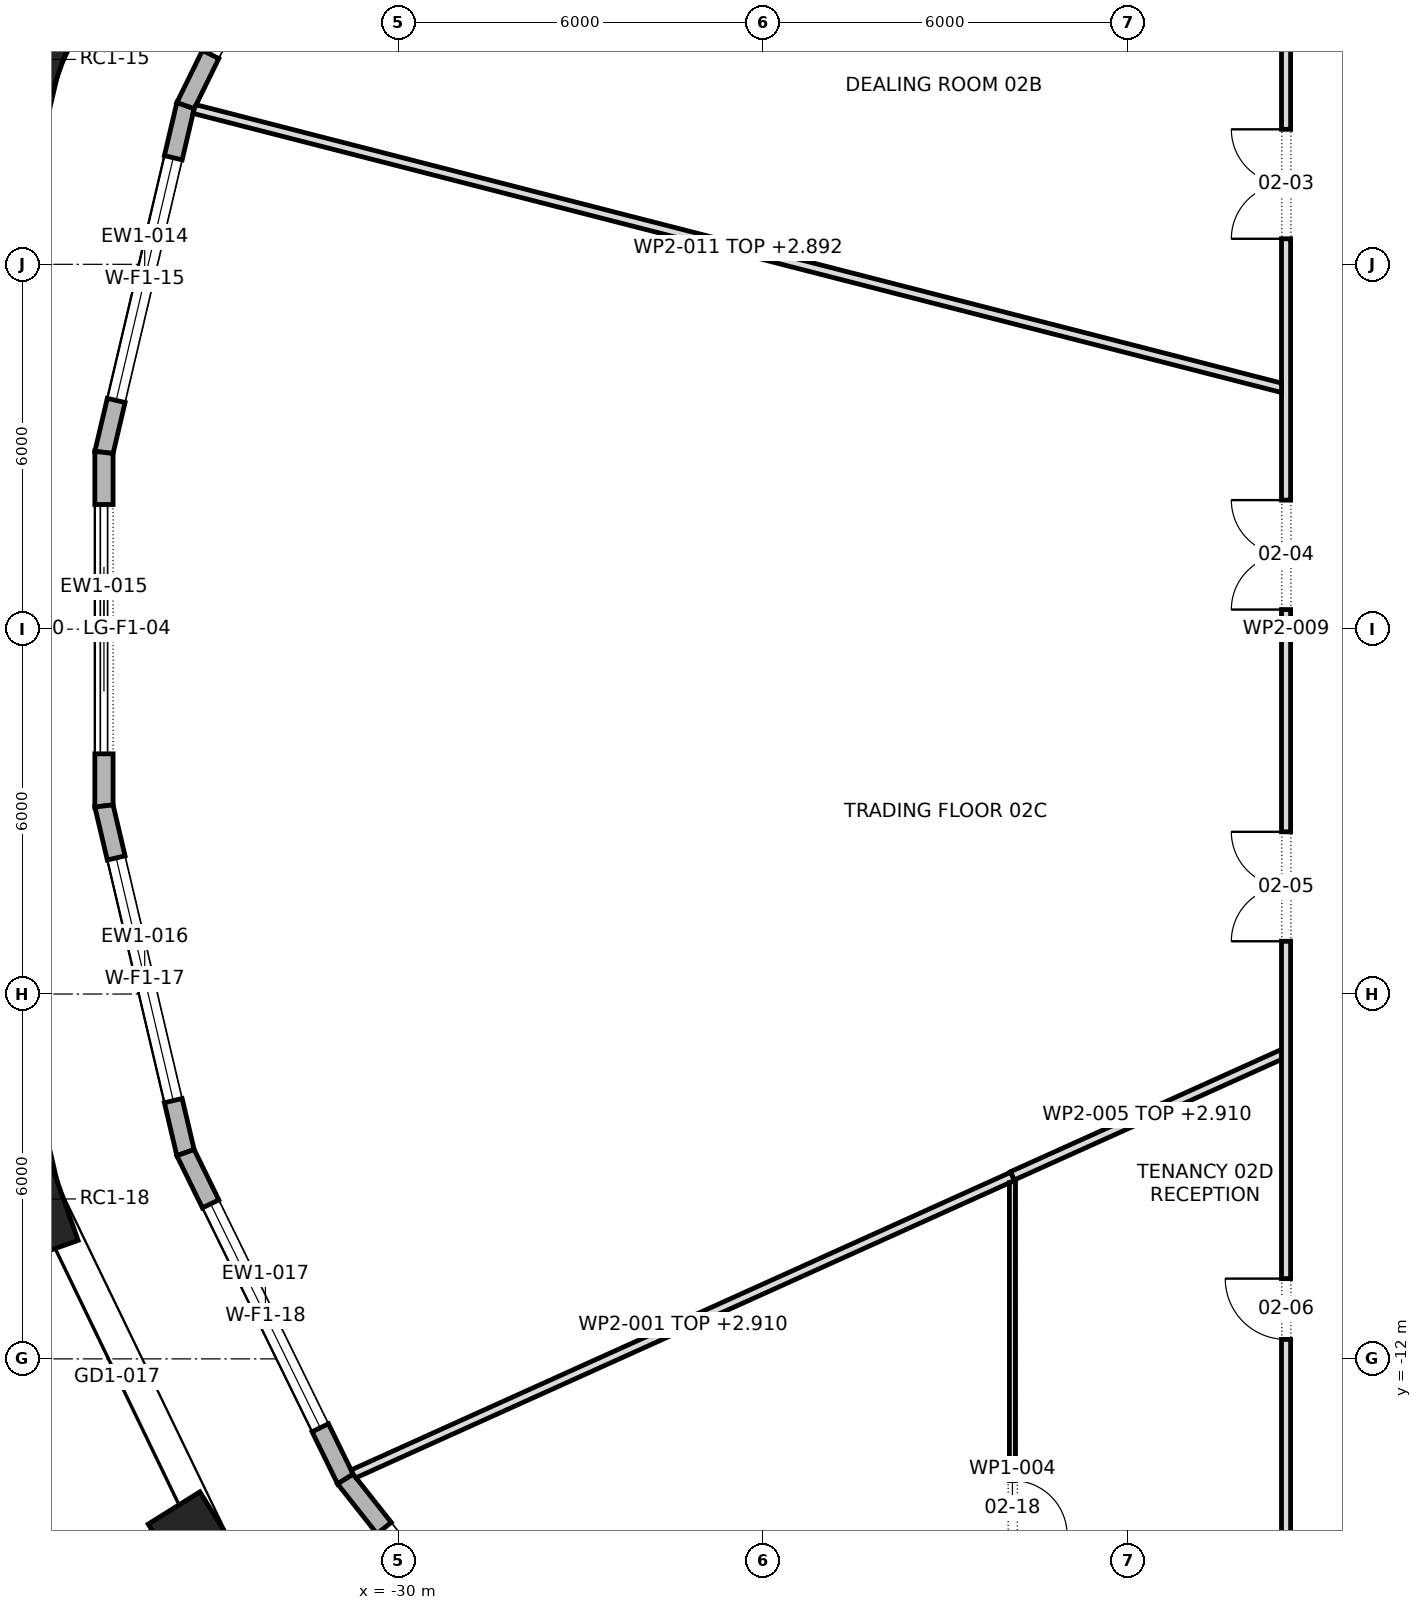
"""IFC4 building model, lengths in metres.
Left out: names, types, materials, properties, quantities, classifications, styles, units other than length and angle.
Written with IfcOpenShell. Run it as: python <this file> out.ifc"""

import sys

from ifc_helpers import new_model, si_unit, direction, frame, frame_2d, origin, origin_2d, place, context, subcontext, project, spatial, polyline, rectangle, outline, extrude, element, fill, save


model = new_model("IFC4")
c1 = context("Model", 3, precision=1e-05, world=origin(), true_north=direction((0.0, 1.0)))
c2 = subcontext(c1, "Body", "Model", "MODEL_VIEW")
j1 = project(units=[si_unit("LENGTHUNIT", "METRE"), si_unit("PLANEANGLEUNIT", "RADIAN")], contexts=[c1])
p1 = place(None, origin())
s1 = spatial("IfcSite", under=j1, at=p1, CompositionType="ELEMENT")
p2 = place(p1, origin())
s2 = spatial("IfcBuilding", under=s1, at=p2, CompositionType="ELEMENT")
p3 = place(p2, frame((0.0, 0.0, 36.1)))
s3 = spatial("IfcBuildingStorey", under=s2, at=p3, CompositionType="ELEMENT", Elevation=36.1)
for number, where, z_axis, x_axis in (
    (1, (-36.036, 9.37, 0.0), (0.0, 0.0, 1.0), (-0.334, -0.943, 0.0)),
    (2, (-36.036, -9.37, 0.0), (0.0, 0.0, 1.0), (0.334, -0.943, 0.0)),
    (3, (-33.211, -15.216, 0.0), (0.0, 0.0, 1.0), (0.529, -0.849, 0.0)),
):
    element("IfcColumn", number, at=place(p3, frame(where, z_axis=z_axis, x_axis=x_axis)), inside=s3, PredefinedType="COLUMN", context=c2, shape_type="SweptSolid", body=[
        extrude(rectangle(XDim=1.8, YDim=1.0, at=origin_2d()), origin(), (0.0, 0.0, 1.0), 4.2),
    ])
p4 = place(p3, frame((-30.869, 13.976, 0.0), z_axis=(0.0, 0.0, 1.0), x_axis=(-0.439896354052, -0.898048549741, 0.0)))
e4 = element("IfcWall", 4, at=p4, inside=s3, PredefinedType="STANDARD", context=c2, shape_type="SweptSolid", body=[
    extrude(outline(polyline([(-0.016, -0.15), (5.995, -0.15), (5.961, 0.15), (0.016, 0.15), (-0.016, -0.15)])), origin(), (0.0, 0.0, 1.0), 3.9),
])
p5 = place(p4, frame((0.939, 0.0, 0.6)))
e5 = element("IfcOpeningElement", 5, at=p5, cuts=e4, PredefinedType="OPENING", context=c2, shape_type="SweptSolid", body=[
    extrude(rectangle(XDim=4.1, YDim=2.85, at=frame_2d((2.05, 1.425))), frame((0.0, 0.162, 0.0), z_axis=(0.0, -1.0, 0.0), x_axis=(1.0, 0.0, 0.0)), (0.0, 0.0, 1.0), 0.324),
])
p6 = place(p3, frame((-33.499, 8.608, 0.0), z_axis=(0.0, 0.0, 1.0), x_axis=(-0.228976600496, -0.97343192696, 0.0)))
e6 = element("IfcWall", 6, at=p6, inside=s3, PredefinedType="STANDARD", context=c2, shape_type="SweptSolid", body=[
    extrude(outline(polyline([(-0.017, -0.15), (5.874, -0.15), (5.839, 0.15), (0.017, 0.15), (-0.017, -0.15)])), origin(), (0.0, 0.0, 1.0), 3.9),
])
p7 = place(p6, frame((0.878, 0.0, 0.6)))
e7 = element("IfcOpeningElement", 7, at=p7, cuts=e6, PredefinedType="OPENING", context=c2, shape_type="SweptSolid", body=[
    extrude(rectangle(XDim=4.1, YDim=2.85, at=frame_2d((2.05, 1.425))), frame((0.0, 0.162, 0.0), z_axis=(0.0, -1.0, 0.0), x_axis=(1.0, 0.0, 0.0)), (0.0, 0.0, 1.0), 0.324),
])
p8 = place(p3, frame((-34.84, 2.907, 0.0), z_axis=(0.0, 0.0, 1.0), x_axis=(0.0, -1.0, 0.0)))
e8 = element("IfcWall", 8, at=p8, inside=s3, PredefinedType="STANDARD", context=c2, shape_type="SweptSolid", body=[
    extrude(outline(polyline([(-0.017, -0.15), (5.831, -0.15), (5.796, 0.15), (0.017, 0.15), (-0.017, -0.15)])), origin(), (0.0, 0.0, 1.0), 3.9),
])
p9 = place(p8, frame((0.857, 0.0, 0.0)))
e9 = element("IfcOpeningElement", 9, at=p9, cuts=e8, PredefinedType="OPENING", context=c2, shape_type="SweptSolid", body=[
    extrude(rectangle(XDim=4.1, YDim=3.45, at=frame_2d((2.05, 1.725))), frame((0.0, 0.162, 0.0), z_axis=(0.0, -1.0, 0.0), x_axis=(1.0, 0.0, 0.0)), (0.0, 0.0, 1.0), 0.324),
])
p10 = place(p3, frame((-34.84, -2.907, 0.0), z_axis=(0.0, 0.0, 1.0), x_axis=(0.228976600496, -0.97343192696, 0.0)))
e10 = element("IfcWall", 10, at=p10, inside=s3, PredefinedType="STANDARD", context=c2, shape_type="SweptSolid", body=[
    extrude(outline(polyline([(-0.017, -0.15), (5.874, -0.15), (5.84, 0.15), (0.017, 0.15), (-0.017, -0.15)])), origin(), (0.0, 0.0, 1.0), 3.9),
])
p11 = place(p10, frame((0.878, 0.0, 0.6)))
e11 = element("IfcOpeningElement", 11, at=p11, cuts=e10, PredefinedType="OPENING", context=c2, shape_type="SweptSolid", body=[
    extrude(rectangle(XDim=4.1, YDim=2.85, at=frame_2d((2.05, 1.425))), frame((0.0, 0.162, 0.0), z_axis=(0.0, -1.0, 0.0), x_axis=(1.0, 0.0, 0.0)), (0.0, 0.0, 1.0), 0.324),
])
p12 = place(p3, frame((-33.499, -8.608, 0.0), z_axis=(0.0, 0.0, 1.0), x_axis=(0.439896354052, -0.898048549741, 0.0)))
e12 = element("IfcWall", 12, at=p12, inside=s3, PredefinedType="STANDARD", context=c2, shape_type="SweptSolid", body=[
    extrude(outline(polyline([(-0.017, -0.15), (5.994, -0.15), (5.962, 0.15), (0.017, 0.15), (-0.017, -0.15)])), origin(), (0.0, 0.0, 1.0), 3.9),
])
p13 = place(p12, frame((0.939, 0.0, 0.6)))
e13 = element("IfcOpeningElement", 13, at=p13, cuts=e12, PredefinedType="OPENING", context=c2, shape_type="SweptSolid", body=[
    extrude(rectangle(XDim=4.1, YDim=2.85, at=frame_2d((2.05, 1.425))), frame((0.0, 0.162, 0.0), z_axis=(0.0, -1.0, 0.0), x_axis=(1.0, 0.0, 0.0)), (0.0, 0.0, 1.0), 0.324),
])
p14 = place(p3, frame((-30.869, -13.976, 0.0), z_axis=(0.0, 0.0, 1.0), x_axis=(0.61992334328, -0.784662378642, 0.0)))
e14 = element("IfcWall", 14, at=p14, inside=s3, PredefinedType="STANDARD", context=c2, shape_type="SweptSolid", body=[
    extrude(outline(polyline([(-0.016, -0.15), (6.17, -0.15), (6.14, 0.15), (0.016, 0.15), (-0.016, -0.15)])), origin(), (0.0, 0.0, 1.0), 3.9),
])
p15 = place(p14, frame((1.027, 0.0, 0.6)))
e15 = element("IfcOpeningElement", 15, at=p15, cuts=e14, PredefinedType="OPENING", context=c2, shape_type="SweptSolid", body=[
    extrude(rectangle(XDim=4.1, YDim=2.85, at=frame_2d((2.05, 1.425))), frame((0.0, 0.162, 0.0), z_axis=(0.0, -1.0, 0.0), x_axis=(1.0, 0.0, 0.0)), (0.0, 0.0, 1.0), 0.324),
])
p16 = place(p3, frame((-30.744, -13.896, 0.0), z_axis=(0.0, 0.0, 1.0), x_axis=(0.91143189519, 0.411450969654, 0.0)))
e16 = element("IfcWall", 16, at=p16, inside=s3, PredefinedType="PARTITIONING", context=c2, shape_type="SweptSolid", body=[
    extrude(outline(polyline([(0.021, -0.075), (1.985, -0.075), (3.95, -0.075), (5.915, -0.075), (7.88, -0.075), (9.845, -0.075), (11.81, -0.075), (11.811, -0.073), (11.815, -0.075), (11.902, -0.075), (11.902, -0.066), (11.902, -0.066), (11.902, 0.062), (11.902, 0.075), (9.919, 0.075), (7.935, 0.075), (5.951, 0.075), (3.968, 0.075), (1.984, 0.075), (0.0, 0.075), (0.0, 0.066), (0.002, -0.001), (0.021, -0.075)])), origin(), (0.0, 0.0, 1.0), 2.91),
])
p17 = place(p3, frame((-19.9, -19.95, 0.0), z_axis=(0.0, 0.0, 1.0), x_axis=(0.0, 1.0, 0.0)))
e17 = element("IfcWall", 17, at=p17, inside=s3, PredefinedType="PARTITIONING", context=c2, shape_type="SweptSolid", body=[
    extrude(outline(polyline([(10.9, -0.05), (10.9, -0.049), (10.892, -0.031), (10.883, -0.034), (10.845, 0.05), (9.038, 0.05), (7.23, 0.05), (5.423, 0.05), (3.615, 0.05), (1.808, 0.05), (0.0, 0.05), (0.1, -0.05), (0.1, -0.05), (1.9, -0.05), (3.7, -0.05), (5.5, -0.05), (7.3, -0.05), (9.1, -0.05), (10.9, -0.05)])), origin(), (0.0, 0.0, 1.0), 3.9),
])
p18 = place(p17, frame((5.05, 0.0, 0.0)))
e18 = element("IfcOpeningElement", 18, at=p18, cuts=e17, PredefinedType="OPENING", context=c2, shape_type="SweptSolid", body=[
    extrude(rectangle(XDim=0.9, YDim=2.1, at=frame_2d((0.45, 1.05))), frame((0.0, 0.062, 0.0), z_axis=(0.0, -1.0, 0.0), x_axis=(1.0, 0.0, 0.0)), (0.0, 0.0, 1.0), 0.124),
])
p19 = place(p3, frame((-19.9, -8.99, 0.0), z_axis=(0.0, 0.0, 1.0), x_axis=(0.911546381607, 0.411197269178, 0.0)))
e19 = element("IfcWall", 19, at=p19, inside=s3, PredefinedType="PARTITIONING", context=c2, shape_type="SweptSolid", body=[
    extrude(outline(polyline([(0.02, -0.075), (1.62, -0.075), (3.22, -0.075), (4.821, -0.075), (4.888, 0.075), (3.259, 0.075), (1.629, 0.075), (0.0, 0.075), (0.0, -0.066), (0.02, -0.075)])), origin(), (0.0, 0.0, 1.0), 2.91),
])
p20 = place(p3, frame((-15.4, -15.475, 0.0), z_axis=(0.0, 0.0, 1.0), x_axis=(0.0, 1.0, 0.0)))
e20 = element("IfcWall", 20, at=p20, inside=s3, PredefinedType="PARTITIONING", context=c2, shape_type="SweptSolid", body=[
    extrude(outline(polyline([(0.15, -0.075), (2.066, -0.075), (3.981, -0.075), (5.897, -0.075), (7.812, -0.075), (9.728, -0.075), (11.644, -0.075), (13.56, -0.075), (15.475, -0.075), (17.391, -0.075), (19.306, -0.075), (21.222, -0.075), (23.138, -0.075), (25.053, -0.075), (26.969, -0.075), (28.885, -0.075), (30.8, -0.075), (30.95, 0.075), (29.016, 0.075), (27.081, 0.075), (25.147, 0.075), (23.212, 0.075), (21.278, 0.075), (19.344, 0.075), (17.409, 0.075), (15.475, 0.075), (13.541, 0.075), (11.606, 0.075), (9.672, 0.075), (7.738, 0.075), (5.803, 0.075), (3.869, 0.075), (1.935, 0.075), (0.0, 0.075), (0.15, -0.075)])), origin(), (0.0, 0.0, 1.0), 3.9),
])
p21 = place(p20, frame((28.02, 0.0, 0.0)))
e21 = element("IfcOpeningElement", 21, at=p21, cuts=e20, PredefinedType="OPENING", context=c2, shape_type="SweptSolid", body=[
    extrude(rectangle(XDim=1.0, YDim=2.1, at=frame_2d((0.5, 1.05))), frame((0.0, 0.087, 0.0), z_axis=(0.0, -1.0, 0.0), x_axis=(1.0, 0.0, 0.0)), (0.0, 0.0, 1.0), 0.174),
])
p22 = place(p20, frame((21.895, 0.0, 0.0)))
e22 = element("IfcOpeningElement", 22, at=p22, cuts=e20, PredefinedType="OPENING", context=c2, shape_type="SweptSolid", body=[
    extrude(rectangle(XDim=1.8, YDim=2.1, at=frame_2d((0.9, 1.05))), frame((0.0, 0.087, 0.0), z_axis=(0.0, -1.0, 0.0), x_axis=(1.0, 0.0, 0.0)), (0.0, 0.0, 1.0), 0.174),
])
p23 = place(p20, frame((15.798, 0.0, 0.0)))
e23 = element("IfcOpeningElement", 23, at=p23, cuts=e20, PredefinedType="OPENING", context=c2, shape_type="SweptSolid", body=[
    extrude(rectangle(XDim=1.8, YDim=2.1, at=frame_2d((0.9, 1.05))), frame((0.0, 0.087, 0.0), z_axis=(0.0, -1.0, 0.0), x_axis=(1.0, 0.0, 0.0)), (0.0, 0.0, 1.0), 0.174),
])
p24 = place(p20, frame((10.343, 0.0, 0.0)))
e24 = element("IfcOpeningElement", 24, at=p24, cuts=e20, PredefinedType="OPENING", context=c2, shape_type="SweptSolid", body=[
    extrude(rectangle(XDim=1.8, YDim=2.1, at=frame_2d((0.9, 1.05))), frame((0.0, 0.087, 0.0), z_axis=(0.0, -1.0, 0.0), x_axis=(1.0, 0.0, 0.0)), (0.0, 0.0, 1.0), 0.174),
])
p25 = place(p20, frame((3.795, 0.0, 0.0)))
e25 = element("IfcOpeningElement", 25, at=p25, cuts=e20, PredefinedType="OPENING", context=c2, shape_type="SweptSolid", body=[
    extrude(rectangle(XDim=1.0, YDim=2.1, at=frame_2d((0.5, 1.05))), frame((0.0, 0.087, 0.0), z_axis=(0.0, -1.0, 0.0), x_axis=(1.0, 0.0, 0.0)), (0.0, 0.0, 1.0), 0.174),
])
p26 = place(p3, frame((-15.457, 3.965, 0.0), z_axis=(0.0, 0.0, 1.0), x_axis=(-0.968658160146, 0.248397602209, 0.0)))
e26 = element("IfcWall", 26, at=p26, inside=s3, PredefinedType="PARTITIONING", context=c2, shape_type="SweptSolid", body=[
    extrude(outline(polyline([(0.038, -0.075), (1.881, -0.075), (3.723, -0.075), (5.566, -0.075), (7.409, -0.075), (9.251, -0.075), (11.094, -0.075), (12.937, -0.075), (14.779, -0.075), (16.622, -0.075), (18.465, -0.075), (18.478, -0.012), (18.478, 0.075), (16.63, 0.075), (14.782, 0.075), (12.935, 0.075), (11.087, 0.075), (9.239, 0.075), (7.391, 0.075), (5.543, 0.075), (3.696, 0.075), (1.848, 0.075), (0.0, 0.075), (0.0, 0.073), (0.038, -0.075)])), origin(), (0.0, 0.0, 1.0), 2.892),
])
p27 = place(p5, origin())
e27 = element("IfcWindow", 27, at=p27, inside=s3, PartitioningType="TRIPLE_PANEL_VERTICAL", PredefinedType="WINDOW", context=c2, shape_type="SweptSolid", body=[
    extrude(rectangle(XDim=4.1, YDim=2.85, at=frame_2d((2.05, 1.425))), frame((0.0, 0.03, 0.0), z_axis=(0.0, -1.0, 0.0), x_axis=(1.0, 0.0, 0.0)), (0.0, 0.0, 1.0), 0.06),
])
fill(e5, e27)
p28 = place(p7, origin())
e28 = element("IfcWindow", 28, at=p28, inside=s3, PartitioningType="TRIPLE_PANEL_VERTICAL", PredefinedType="WINDOW", context=c2, shape_type="SweptSolid", body=[
    extrude(rectangle(XDim=4.1, YDim=2.85, at=frame_2d((2.05, 1.425))), frame((0.0, 0.03, 0.0), z_axis=(0.0, -1.0, 0.0), x_axis=(1.0, 0.0, 0.0)), (0.0, 0.0, 1.0), 0.06),
])
fill(e7, e28)
p29 = place(p9, origin())
e29 = element("IfcDoor", 29, at=p29, inside=s3, OperationType="DOUBLE_DOOR_SLIDING", PredefinedType="DOOR", context=c2, shape_type="SweptSolid", body=[
    extrude(rectangle(XDim=4.1, YDim=3.45, at=frame_2d((2.05, 1.725))), frame((0.0, 0.025, 0.0), z_axis=(0.0, -1.0, 0.0), x_axis=(1.0, 0.0, 0.0)), (0.0, 0.0, 1.0), 0.05),
])
fill(e9, e29)
p30 = place(p11, origin())
e30 = element("IfcWindow", 30, at=p30, inside=s3, PartitioningType="TRIPLE_PANEL_VERTICAL", PredefinedType="WINDOW", context=c2, shape_type="SweptSolid", body=[
    extrude(rectangle(XDim=4.1, YDim=2.85, at=frame_2d((2.05, 1.425))), frame((0.0, 0.03, 0.0), z_axis=(0.0, -1.0, 0.0), x_axis=(1.0, 0.0, 0.0)), (0.0, 0.0, 1.0), 0.06),
])
fill(e11, e30)
p31 = place(p13, origin())
e31 = element("IfcWindow", 31, at=p31, inside=s3, PartitioningType="TRIPLE_PANEL_VERTICAL", PredefinedType="WINDOW", context=c2, shape_type="SweptSolid", body=[
    extrude(rectangle(XDim=4.1, YDim=2.85, at=frame_2d((2.05, 1.425))), frame((0.0, 0.03, 0.0), z_axis=(0.0, -1.0, 0.0), x_axis=(1.0, 0.0, 0.0)), (0.0, 0.0, 1.0), 0.06),
])
fill(e13, e31)
p32 = place(p15, origin())
e32 = element("IfcWindow", 32, at=p32, inside=s3, PartitioningType="TRIPLE_PANEL_VERTICAL", PredefinedType="WINDOW", context=c2, shape_type="SweptSolid", body=[
    extrude(rectangle(XDim=4.1, YDim=2.85, at=frame_2d((2.05, 1.425))), frame((0.0, 0.03, 0.0), z_axis=(0.0, -1.0, 0.0), x_axis=(1.0, 0.0, 0.0)), (0.0, 0.0, 1.0), 0.06),
])
fill(e15, e32)
p33 = place(p22, origin())
e33 = element("IfcDoor", 33, at=p33, inside=s3, OperationType="DOUBLE_DOOR_SINGLE_SWING", PredefinedType="DOOR", context=c2, shape_type="SweptSolid", body=[
    extrude(rectangle(XDim=1.8, YDim=2.1, at=frame_2d((0.9, 1.05))), frame((0.0, 0.025, 0.0), z_axis=(0.0, -1.0, 0.0), x_axis=(1.0, 0.0, 0.0)), (0.0, 0.0, 1.0), 0.05),
])
fill(e22, e33)
p34 = place(p23, origin())
e34 = element("IfcDoor", 34, at=p34, inside=s3, OperationType="DOUBLE_DOOR_SINGLE_SWING", PredefinedType="DOOR", context=c2, shape_type="SweptSolid", body=[
    extrude(rectangle(XDim=1.8, YDim=2.1, at=frame_2d((0.9, 1.05))), frame((0.0, 0.025, 0.0), z_axis=(0.0, -1.0, 0.0), x_axis=(1.0, 0.0, 0.0)), (0.0, 0.0, 1.0), 0.05),
])
fill(e23, e34)
p35 = place(p24, origin())
e35 = element("IfcDoor", 35, at=p35, inside=s3, OperationType="DOUBLE_DOOR_SINGLE_SWING", PredefinedType="DOOR", context=c2, shape_type="SweptSolid", body=[
    extrude(rectangle(XDim=1.8, YDim=2.1, at=frame_2d((0.9, 1.05))), frame((0.0, 0.025, 0.0), z_axis=(0.0, -1.0, 0.0), x_axis=(1.0, 0.0, 0.0)), (0.0, 0.0, 1.0), 0.05),
])
fill(e24, e35)
p36 = place(p25, origin())
e36 = element("IfcDoor", 36, at=p36, inside=s3, OperationType="SINGLE_SWING_LEFT", PredefinedType="DOOR", context=c2, shape_type="SweptSolid", body=[
    extrude(rectangle(XDim=1.0, YDim=2.1, at=frame_2d((0.5, 1.05))), frame((0.0, 0.025, 0.0), z_axis=(0.0, -1.0, 0.0), x_axis=(1.0, 0.0, 0.0)), (0.0, 0.0, 1.0), 0.05),
])
fill(e25, e36)
p37 = place(p18, frame((0.9, 0.0, 0.0), z_axis=(0.0, 0.0, 1.0), x_axis=(-1.0, 0.0, 0.0)))
e37 = element("IfcDoor", 37, at=p37, inside=s3, OperationType="SINGLE_SWING_LEFT", PredefinedType="DOOR", context=c2, shape_type="SweptSolid", body=[
    extrude(rectangle(XDim=0.9, YDim=2.1, at=frame_2d((0.45, 1.05))), frame((0.0, 0.025, 0.0), z_axis=(0.0, -1.0, 0.0), x_axis=(1.0, 0.0, 0.0)), (0.0, 0.0, 1.0), 0.05),
])
fill(e18, e37)
save(model, sys.argv[1])
